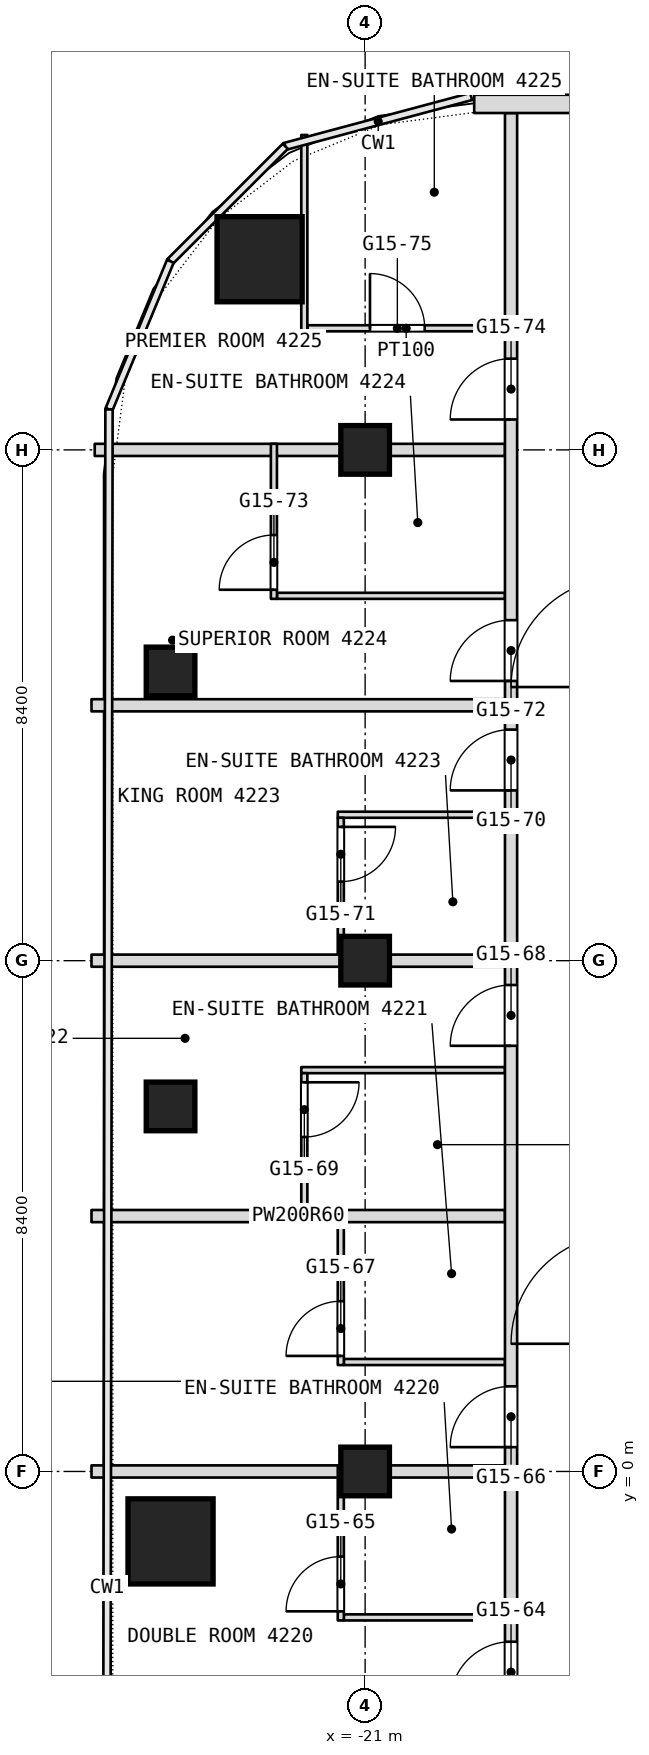
"""IFC4 building model, lengths in metres.
Left out: names, types, materials, properties, quantities, classifications, styles, units other than length and angle.
Written with IfcOpenShell. Run it as: python <this file> out.ifc"""

import sys

from ifc_helpers import new_model, si_unit, direction, frame, frame_2d, origin, origin_2d, place, context, subcontext, project, spatial, rectangle, extrude, element, fill, save


model = new_model("IFC4")
c1 = context("Model", 3, precision=1e-05, world=origin(), true_north=direction((0.0, 1.0)))
c2 = subcontext(c1, "Body", "Model", "MODEL_VIEW")
j1 = project(units=[si_unit("LENGTHUNIT", "METRE"), si_unit("PLANEANGLEUNIT", "RADIAN")], contexts=[c1])
p1 = place(None, origin())
s1 = spatial("IfcSite", under=j1, at=p1, CompositionType="ELEMENT")
p2 = place(p1, origin())
s2 = spatial("IfcBuilding", under=s1, at=p2, CompositionType="ELEMENT")
p3 = place(p2, frame((0.0, 0.0, 187.7)))
s3 = spatial("IfcBuildingStorey", under=s2, at=p3, CompositionType="ELEMENT", Elevation=187.7)
for number, where, z_axis, x_axis in (
    (1, (-22.736, 19.936, 0.0), (0.0, 0.0, 1.0), (1.0, 0.0, 0.0)),
    (2, (-24.2, -1.15, 0.0), (0.0, 0.0, 1.0), (1.0, 0.0, 0.0)),
):
    element("IfcColumn", number, at=place(p3, frame(where, z_axis=z_axis, x_axis=x_axis)), inside=s3, PredefinedType="COLUMN", context=c2, shape_type="SweptSolid", body=[
        extrude(rectangle(XDim=1.4, YDim=1.4, at=origin_2d()), origin(), (0.0, 0.0, 1.0), 3.6),
    ])
for number, where, z_axis, x_axis in (
    (3, (-21.0, 0.0, 0.0), (0.0, 0.0, 1.0), (1.0, 0.0, 0.0)),
    (4, (-21.0, 8.4, 0.0), (0.0, 0.0, 1.0), (1.0, 0.0, 0.0)),
    (5, (-21.0, 16.8, 0.0), (0.0, 0.0, 1.0), (1.0, 0.0, 0.0)),
    (6, (-24.2, 6.003, 0.0), (0.0, 0.0, 1.0), (1.0, 0.0, 0.0)),
    (7, (-24.2, 13.156, 0.0), (0.0, 0.0, 1.0), (1.0, 0.0, 0.0)),
):
    element("IfcColumn", number, at=place(p3, frame(where, z_axis=z_axis, x_axis=x_axis)), inside=s3, PredefinedType="COLUMN", context=c2, shape_type="SweptSolid", body=[
        extrude(rectangle(XDim=0.8, YDim=0.8, at=origin_2d()), origin(), (0.0, 0.0, 1.0), 3.6),
    ])
p4 = place(p3, frame((-21.35, -2.4, 0.0), z_axis=(0.0, 0.0, 1.0), x_axis=(1.0, 0.0, 0.0)))
e8 = element("IfcWall", 8, at=p4, inside=s3, PredefinedType="PARTITIONING", context=c2, shape_type="SweptSolid", body=[
    extrude(rectangle(XDim=2.65, YDim=0.1, at=frame_2d((1.325, 0.0))), origin(), (0.0, 0.0, 1.0), 3.34),
])
p5 = place(p3, frame((-25.5, 0.0, 0.0), z_axis=(0.0, 0.0, 1.0), x_axis=(1.0, 0.0, 0.0)))
e9 = element("IfcWall", 9, at=p5, inside=s3, PredefinedType="PARTITIONING", context=c2, shape_type="SweptSolid", body=[
    extrude(rectangle(XDim=6.8, YDim=0.2, at=frame_2d((3.4, 0.0))), origin(), (0.0, 0.0, 1.0), 2.94),
])
p6 = place(p3, frame((-21.35, 1.8, 0.0), z_axis=(0.0, 0.0, 1.0), x_axis=(1.0, 0.0, 0.0)))
e10 = element("IfcWall", 10, at=p6, inside=s3, PredefinedType="PARTITIONING", context=c2, shape_type="SweptSolid", body=[
    extrude(rectangle(XDim=2.65, YDim=0.1, at=frame_2d((1.325, 0.0))), origin(), (0.0, 0.0, 1.0), 3.34),
])
p7 = place(p3, frame((-25.5, 4.2, 0.0), z_axis=(0.0, 0.0, 1.0), x_axis=(1.0, 0.0, 0.0)))
e11 = element("IfcWall", 11, at=p7, inside=s3, PredefinedType="PARTITIONING", context=c2, shape_type="SweptSolid", body=[
    extrude(rectangle(XDim=6.8, YDim=0.2, at=frame_2d((3.4, 0.0))), origin(), (0.0, 0.0, 1.0), 3.34),
])
p8 = place(p3, frame((-22.05, 6.6, 0.0), z_axis=(0.0, 0.0, 1.0), x_axis=(1.0, 0.0, 0.0)))
e12 = element("IfcWall", 12, at=p8, inside=s3, PredefinedType="PARTITIONING", context=c2, shape_type="SweptSolid", body=[
    extrude(rectangle(XDim=3.35, YDim=0.1, at=frame_2d((1.675, 0.0))), origin(), (0.0, 0.0, 1.0), 3.34),
])
p9 = place(p3, frame((-25.5, 8.4, 0.0), z_axis=(0.0, 0.0, 1.0), x_axis=(1.0, 0.0, 0.0)))
e13 = element("IfcWall", 13, at=p9, inside=s3, PredefinedType="PARTITIONING", context=c2, shape_type="SweptSolid", body=[
    extrude(rectangle(XDim=6.8, YDim=0.2, at=frame_2d((3.4, 0.0))), origin(), (0.0, 0.0, 1.0), 2.94),
])
p10 = place(p3, frame((-21.45, 10.8, 0.0), z_axis=(0.0, 0.0, 1.0), x_axis=(1.0, 0.0, 0.0)))
e14 = element("IfcWall", 14, at=p10, inside=s3, PredefinedType="PARTITIONING", context=c2, shape_type="SweptSolid", body=[
    extrude(rectangle(XDim=2.75, YDim=0.1, at=frame_2d((1.375, 0.0))), origin(), (0.0, 0.0, 1.0), 3.34),
])
p11 = place(p3, frame((-25.5, 12.6, 0.0), z_axis=(0.0, 0.0, 1.0), x_axis=(1.0, 0.0, 0.0)))
e15 = element("IfcWall", 15, at=p11, inside=s3, PredefinedType="PARTITIONING", context=c2, shape_type="SweptSolid", body=[
    extrude(rectangle(XDim=6.8, YDim=0.2, at=frame_2d((3.4, 0.0))), origin(), (0.0, 0.0, 1.0), 3.34),
])
p12 = place(p3, frame((-22.45, 14.4, 0.0), z_axis=(0.0, 0.0, 1.0), x_axis=(1.0, 0.0, 0.0)))
e16 = element("IfcWall", 16, at=p12, inside=s3, PredefinedType="PARTITIONING", context=c2, shape_type="SweptSolid", body=[
    extrude(rectangle(XDim=3.75, YDim=0.1, at=frame_2d((1.875, 0.0))), origin(), (0.0, 0.0, 1.0), 3.34),
])
p13 = place(p3, frame((-25.447, 16.8, 0.0), z_axis=(0.0, 0.0, 1.0), x_axis=(1.0, 0.0, 0.0)))
e17 = element("IfcWall", 17, at=p13, inside=s3, PredefinedType="PARTITIONING", context=c2, shape_type="SweptSolid", body=[
    extrude(rectangle(XDim=6.747, YDim=0.2, at=frame_2d((3.374, 0.0))), origin(), (0.0, 0.0, 1.0), 2.94),
])
p14 = place(p3, frame((-18.6, -26.751, 0.0), z_axis=(0.0, 0.0, 1.0), x_axis=(0.0, 1.0, 0.0)))
e18 = element("IfcWall", 18, at=p14, inside=s3, PredefinedType="PARTITIONING", context=c2, shape_type="SweptSolid", body=[
    extrude(rectangle(XDim=49.091, YDim=0.2, at=frame_2d((24.545, 0.0))), origin(), (0.0, 0.0, 1.0), 3.34),
])
p15 = place(p14, frame((3.413, 0.0, 0.0)))
e19 = element("IfcOpeningElement", 19, at=p15, cuts=e18, PredefinedType="OPENING", context=c2, shape_type="SweptSolid", body=[
    extrude(rectangle(XDim=1.0, YDim=2.1, at=frame_2d((0.5, 1.05))), frame((0.0, 0.1, 0.0), z_axis=(0.0, -1.0, 0.0), x_axis=(1.0, 0.0, 0.0)), (0.0, 0.0, 1.0), 0.2),
])
p16 = place(p14, frame((5.838, 0.0, 0.0)))
e20 = element("IfcOpeningElement", 20, at=p16, cuts=e18, PredefinedType="OPENING", context=c2, shape_type="SweptSolid", body=[
    extrude(rectangle(XDim=1.0, YDim=2.1, at=frame_2d((0.5, 1.05))), frame((0.0, 0.1, 0.0), z_axis=(0.0, -1.0, 0.0), x_axis=(1.0, 0.0, 0.0)), (0.0, 0.0, 1.0), 0.2),
])
p17 = place(p14, frame((10.351, 0.0, 0.0)))
e21 = element("IfcOpeningElement", 21, at=p17, cuts=e18, PredefinedType="OPENING", context=c2, shape_type="SweptSolid", body=[
    extrude(rectangle(XDim=1.0, YDim=2.1, at=frame_2d((0.5, 1.05))), frame((0.0, 0.1, 0.0), z_axis=(0.0, -1.0, 0.0), x_axis=(1.0, 0.0, 0.0)), (0.0, 0.0, 1.0), 0.2),
])
p18 = place(p14, frame((16.951, 0.0, 0.0)))
e22 = element("IfcOpeningElement", 22, at=p18, cuts=e18, PredefinedType="OPENING", context=c2, shape_type="SweptSolid", body=[
    extrude(rectangle(XDim=1.0, YDim=2.1, at=frame_2d((0.5, 1.05))), frame((0.0, 0.1, 0.0), z_axis=(0.0, -1.0, 0.0), x_axis=(1.0, 0.0, 0.0)), (0.0, 0.0, 1.0), 0.2),
])
p19 = place(p14, frame((21.151, 0.0, 0.0)))
e23 = element("IfcOpeningElement", 23, at=p19, cuts=e18, PredefinedType="OPENING", context=c2, shape_type="SweptSolid", body=[
    extrude(rectangle(XDim=1.0, YDim=2.1, at=frame_2d((0.5, 1.05))), frame((0.0, 0.1, 0.0), z_axis=(0.0, -1.0, 0.0), x_axis=(1.0, 0.0, 0.0)), (0.0, 0.0, 1.0), 0.2),
])
p20 = place(p14, frame((22.951, 0.0, 0.0)))
e24 = element("IfcOpeningElement", 24, at=p20, cuts=e18, PredefinedType="OPENING", context=c2, shape_type="SweptSolid", body=[
    extrude(rectangle(XDim=1.0, YDim=2.1, at=frame_2d((0.5, 1.05))), frame((0.0, 0.1, 0.0), z_axis=(0.0, -1.0, 0.0), x_axis=(1.0, 0.0, 0.0)), (0.0, 0.0, 1.0), 0.2),
])
p21 = place(p14, frame((27.151, 0.0, 0.0)))
e25 = element("IfcOpeningElement", 25, at=p21, cuts=e18, PredefinedType="OPENING", context=c2, shape_type="SweptSolid", body=[
    extrude(rectangle(XDim=1.0, YDim=2.1, at=frame_2d((0.5, 1.05))), frame((0.0, 0.1, 0.0), z_axis=(0.0, -1.0, 0.0), x_axis=(1.0, 0.0, 0.0)), (0.0, 0.0, 1.0), 0.2),
])
p22 = place(p14, frame((33.751, 0.0, 0.0)))
e26 = element("IfcOpeningElement", 26, at=p22, cuts=e18, PredefinedType="OPENING", context=c2, shape_type="SweptSolid", body=[
    extrude(rectangle(XDim=1.0, YDim=2.1, at=frame_2d((0.5, 1.05))), frame((0.0, 0.1, 0.0), z_axis=(0.0, -1.0, 0.0), x_axis=(1.0, 0.0, 0.0)), (0.0, 0.0, 1.0), 0.2),
])
p23 = place(p14, frame((37.951, 0.0, 0.0)))
e27 = element("IfcOpeningElement", 27, at=p23, cuts=e18, PredefinedType="OPENING", context=c2, shape_type="SweptSolid", body=[
    extrude(rectangle(XDim=1.0, YDim=2.1, at=frame_2d((0.5, 1.05))), frame((0.0, 0.1, 0.0), z_axis=(0.0, -1.0, 0.0), x_axis=(1.0, 0.0, 0.0)), (0.0, 0.0, 1.0), 0.2),
])
p24 = place(p14, frame((39.751, 0.0, 0.0)))
e28 = element("IfcOpeningElement", 28, at=p24, cuts=e18, PredefinedType="OPENING", context=c2, shape_type="SweptSolid", body=[
    extrude(rectangle(XDim=1.0, YDim=2.1, at=frame_2d((0.5, 1.05))), frame((0.0, 0.1, 0.0), z_axis=(0.0, -1.0, 0.0), x_axis=(1.0, 0.0, 0.0)), (0.0, 0.0, 1.0), 0.2),
])
p25 = place(p14, frame((44.051, 0.0, 0.0)))
e29 = element("IfcOpeningElement", 29, at=p25, cuts=e18, PredefinedType="OPENING", context=c2, shape_type="SweptSolid", body=[
    extrude(rectangle(XDim=1.0, YDim=2.1, at=frame_2d((0.5, 1.05))), frame((0.0, 0.1, 0.0), z_axis=(0.0, -1.0, 0.0), x_axis=(1.0, 0.0, 0.0)), (0.0, 0.0, 1.0), 0.2),
])
p26 = place(p3, frame((-21.95, 18.8, 0.0), z_axis=(0.0, 0.0, 1.0), x_axis=(1.0, 0.0, 0.0)))
e30 = element("IfcWall", 30, at=p26, inside=s3, PredefinedType="PARTITIONING", context=c2, shape_type="SweptSolid", body=[
    extrude(rectangle(XDim=3.25, YDim=0.1, at=frame_2d((1.625, 0.0))), origin(), (0.0, 0.0, 1.0), 3.34),
])
p27 = place(p26, frame((1.03, 0.0, 0.0)))
e31 = element("IfcOpeningElement", 31, at=p27, cuts=e30, PredefinedType="OPENING", context=c2, shape_type="SweptSolid", body=[
    extrude(rectangle(XDim=0.9, YDim=2.1, at=frame_2d((0.45, 1.05))), frame((0.0, 0.05, 0.0), z_axis=(0.0, -1.0, 0.0), x_axis=(1.0, 0.0, 0.0)), (0.0, 0.0, 1.0), 0.1),
])
p28 = place(p3, frame((-21.4, -2.45, 0.0), z_axis=(0.0, 0.0, 1.0), x_axis=(0.0, 1.0, 0.0)))
e32 = element("IfcWall", 32, at=p28, inside=s3, PredefinedType="PARTITIONING", context=c2, shape_type="SweptSolid", body=[
    extrude(rectangle(XDim=2.55, YDim=0.1, at=frame_2d((1.275, 0.0))), origin(), (0.0, 0.0, 1.0), 3.34),
])
p29 = place(p28, frame((0.15, 0.0, 0.0)))
e33 = element("IfcOpeningElement", 33, at=p29, cuts=e32, PredefinedType="OPENING", context=c2, shape_type="SweptSolid", body=[
    extrude(rectangle(XDim=0.9, YDim=2.1, at=frame_2d((0.45, 1.05))), frame((0.0, 0.05, 0.0), z_axis=(0.0, -1.0, 0.0), x_axis=(1.0, 0.0, 0.0)), (0.0, 0.0, 1.0), 0.1),
])
p30 = place(p3, frame((-21.4, 1.75, 0.0), z_axis=(0.0, 0.0, 1.0), x_axis=(0.0, 1.0, 0.0)))
e34 = element("IfcWall", 34, at=p30, inside=s3, PredefinedType="PARTITIONING", context=c2, shape_type="SweptSolid", body=[
    extrude(rectangle(XDim=2.55, YDim=0.1, at=frame_2d((1.275, 0.0))), origin(), (0.0, 0.0, 1.0), 3.34),
])
p31 = place(p30, frame((0.15, 0.0, 0.0)))
e35 = element("IfcOpeningElement", 35, at=p31, cuts=e34, PredefinedType="OPENING", context=c2, shape_type="SweptSolid", body=[
    extrude(rectangle(XDim=0.9, YDim=2.1, at=frame_2d((0.45, 1.05))), frame((0.0, 0.05, 0.0), z_axis=(0.0, -1.0, 0.0), x_axis=(1.0, 0.0, 0.0)), (0.0, 0.0, 1.0), 0.1),
])
p32 = place(p3, frame((-21.4, 8.5, 0.0), z_axis=(0.0, 0.0, 1.0), x_axis=(0.0, 1.0, 0.0)))
e36 = element("IfcWall", 36, at=p32, inside=s3, PredefinedType="PARTITIONING", context=c2, shape_type="SweptSolid", body=[
    extrude(rectangle(XDim=2.25, YDim=0.1, at=frame_2d((1.125, 0.0))), origin(), (0.0, 0.0, 1.0), 3.34),
])
p33 = place(p32, frame((1.2, 0.0, 0.0)))
e37 = element("IfcOpeningElement", 37, at=p33, cuts=e36, PredefinedType="OPENING", context=c2, shape_type="SweptSolid", body=[
    extrude(rectangle(XDim=0.9, YDim=2.1, at=frame_2d((0.45, 1.05))), frame((0.0, 0.05, 0.0), z_axis=(0.0, -1.0, 0.0), x_axis=(1.0, 0.0, 0.0)), (0.0, 0.0, 1.0), 0.1),
])
p34 = place(p3, frame((-22.0, 4.3, 0.0), z_axis=(0.0, 0.0, 1.0), x_axis=(0.0, 1.0, 0.0)))
e38 = element("IfcWall", 38, at=p34, inside=s3, PredefinedType="PARTITIONING", context=c2, shape_type="SweptSolid", body=[
    extrude(rectangle(XDim=2.25, YDim=0.1, at=frame_2d((1.125, 0.0))), origin(), (0.0, 0.0, 1.0), 3.34),
])
p35 = place(p34, frame((1.2, 0.0, 0.0)))
e39 = element("IfcOpeningElement", 39, at=p35, cuts=e38, PredefinedType="OPENING", context=c2, shape_type="SweptSolid", body=[
    extrude(rectangle(XDim=0.9, YDim=2.1, at=frame_2d((0.45, 1.05))), frame((0.0, 0.05, 0.0), z_axis=(0.0, -1.0, 0.0), x_axis=(1.0, 0.0, 0.0)), (0.0, 0.0, 1.0), 0.1),
])
p36 = place(p3, frame((-22.0, 18.75, 0.0), z_axis=(0.0, 0.0, 1.0), x_axis=(0.0, 1.0, 0.0)))
e40 = element("IfcWall", 40, at=p36, inside=s3, PredefinedType="PARTITIONING", context=c2, shape_type="SweptSolid", body=[
    extrude(rectangle(XDim=3.229, YDim=0.1, at=frame_2d((1.615, 0.0))), origin(), (0.0, 0.0, 1.0), 3.34),
])
p37 = place(p3, frame((-22.5, 14.35, 0.0), z_axis=(0.0, 0.0, 1.0), x_axis=(0.0, 1.0, 0.0)))
e41 = element("IfcWall", 41, at=p37, inside=s3, PredefinedType="PARTITIONING", context=c2, shape_type="SweptSolid", body=[
    extrude(rectangle(XDim=2.55, YDim=0.1, at=frame_2d((1.275, 0.0))), origin(), (0.0, 0.0, 1.0), 3.34),
])
p38 = place(p37, frame((0.15, 0.0, 0.0)))
e42 = element("IfcOpeningElement", 42, at=p38, cuts=e41, PredefinedType="OPENING", context=c2, shape_type="SweptSolid", body=[
    extrude(rectangle(XDim=0.9, YDim=2.1, at=frame_2d((0.45, 1.05))), frame((0.0, 0.05, 0.0), z_axis=(0.0, -1.0, 0.0), x_axis=(1.0, 0.0, 0.0)), (0.0, 0.0, 1.0), 0.1),
])
p39 = place(p3, frame((19.206, 22.49, 0.0), z_axis=(0.0, 0.0, 1.0), x_axis=(-1.0, 0.0, 0.0)))
e43 = element("IfcWall", 43, at=p39, inside=s3, PredefinedType="NOTDEFINED", context=c2, shape_type="SweptSolid", body=[
    extrude(rectangle(XDim=38.412, YDim=0.3, at=frame_2d((19.206, 0.0))), origin(), (0.0, 0.0, 1.0), 3.6),
])
p40 = place(p39, frame((3.306, 0.0, 0.9)))
e44 = element("IfcOpeningElement", 44, at=p40, cuts=e43, PredefinedType="OPENING", context=c2, shape_type="SweptSolid", body=[
    extrude(rectangle(XDim=2.4, YDim=2.1, at=frame_2d((1.2, 1.05))), frame((0.0, 0.15, 0.0), z_axis=(0.0, -1.0, 0.0), x_axis=(1.0, 0.0, 0.0)), (0.0, 0.0, 1.0), 0.3),
])
p41 = place(p39, frame((7.506, 0.0, 0.9)))
e45 = element("IfcOpeningElement", 45, at=p41, cuts=e43, PredefinedType="OPENING", context=c2, shape_type="SweptSolid", body=[
    extrude(rectangle(XDim=2.4, YDim=2.1, at=frame_2d((1.2, 1.05))), frame((0.0, 0.15, 0.0), z_axis=(0.0, -1.0, 0.0), x_axis=(1.0, 0.0, 0.0)), (0.0, 0.0, 1.0), 0.3),
])
p42 = place(p39, frame((11.706, 0.0, 0.9)))
e46 = element("IfcOpeningElement", 46, at=p42, cuts=e43, PredefinedType="OPENING", context=c2, shape_type="SweptSolid", body=[
    extrude(rectangle(XDim=2.4, YDim=2.1, at=frame_2d((1.2, 1.05))), frame((0.0, 0.15, 0.0), z_axis=(0.0, -1.0, 0.0), x_axis=(1.0, 0.0, 0.0)), (0.0, 0.0, 1.0), 0.3),
])
p43 = place(p39, frame((15.906, 0.0, 0.9)))
e47 = element("IfcOpeningElement", 47, at=p43, cuts=e43, PredefinedType="OPENING", context=c2, shape_type="SweptSolid", body=[
    extrude(rectangle(XDim=2.4, YDim=2.1, at=frame_2d((1.2, 1.05))), frame((0.0, 0.15, 0.0), z_axis=(0.0, -1.0, 0.0), x_axis=(1.0, 0.0, 0.0)), (0.0, 0.0, 1.0), 0.3),
])
p44 = place(p39, frame((20.106, 0.0, 0.9)))
e48 = element("IfcOpeningElement", 48, at=p44, cuts=e43, PredefinedType="OPENING", context=c2, shape_type="SweptSolid", body=[
    extrude(rectangle(XDim=2.4, YDim=2.1, at=frame_2d((1.2, 1.05))), frame((0.0, 0.15, 0.0), z_axis=(0.0, -1.0, 0.0), x_axis=(1.0, 0.0, 0.0)), (0.0, 0.0, 1.0), 0.3),
])
p45 = place(p39, frame((24.306, 0.0, 0.9)))
e49 = element("IfcOpeningElement", 49, at=p45, cuts=e43, PredefinedType="OPENING", context=c2, shape_type="SweptSolid", body=[
    extrude(rectangle(XDim=2.4, YDim=2.1, at=frame_2d((1.2, 1.05))), frame((0.0, 0.15, 0.0), z_axis=(0.0, -1.0, 0.0), x_axis=(1.0, 0.0, 0.0)), (0.0, 0.0, 1.0), 0.3),
])
p46 = place(p39, frame((28.506, 0.0, 0.9)))
e50 = element("IfcOpeningElement", 50, at=p46, cuts=e43, PredefinedType="OPENING", context=c2, shape_type="SweptSolid", body=[
    extrude(rectangle(XDim=2.4, YDim=2.1, at=frame_2d((1.2, 1.05))), frame((0.0, 0.15, 0.0), z_axis=(0.0, -1.0, 0.0), x_axis=(1.0, 0.0, 0.0)), (0.0, 0.0, 1.0), 0.3),
])
p47 = place(p39, frame((32.706, 0.0, 0.9)))
e51 = element("IfcOpeningElement", 51, at=p47, cuts=e43, PredefinedType="OPENING", context=c2, shape_type="SweptSolid", body=[
    extrude(rectangle(XDim=2.4, YDim=2.1, at=frame_2d((1.2, 1.05))), frame((0.0, 0.15, 0.0), z_axis=(0.0, -1.0, 0.0), x_axis=(1.0, 0.0, 0.0)), (0.0, 0.0, 1.0), 0.3),
])
p48 = place(p20, origin())
e52 = element("IfcDoor", 52, at=p48, inside=s3, OperationType="SINGLE_SWING_LEFT", PredefinedType="DOOR", context=c2, shape_type="SweptSolid", body=[
    extrude(rectangle(XDim=1.0, YDim=2.1, at=frame_2d((0.5, 1.05))), frame((0.0, 0.025, 0.0), z_axis=(0.0, -1.0, 0.0), x_axis=(1.0, 0.0, 0.0)), (0.0, 0.0, 1.0), 0.05),
])
fill(e24, e52)
p49 = place(p21, origin())
e53 = element("IfcDoor", 53, at=p49, inside=s3, OperationType="SINGLE_SWING_LEFT", PredefinedType="DOOR", context=c2, shape_type="SweptSolid", body=[
    extrude(rectangle(XDim=1.0, YDim=2.1, at=frame_2d((0.5, 1.05))), frame((0.0, 0.025, 0.0), z_axis=(0.0, -1.0, 0.0), x_axis=(1.0, 0.0, 0.0)), (0.0, 0.0, 1.0), 0.05),
])
fill(e25, e53)
p50 = place(p22, origin())
e54 = element("IfcDoor", 54, at=p50, inside=s3, OperationType="SINGLE_SWING_LEFT", PredefinedType="DOOR", context=c2, shape_type="SweptSolid", body=[
    extrude(rectangle(XDim=1.0, YDim=2.1, at=frame_2d((0.5, 1.05))), frame((0.0, 0.025, 0.0), z_axis=(0.0, -1.0, 0.0), x_axis=(1.0, 0.0, 0.0)), (0.0, 0.0, 1.0), 0.05),
])
fill(e26, e54)
p51 = place(p23, origin())
e55 = element("IfcDoor", 55, at=p51, inside=s3, OperationType="SINGLE_SWING_LEFT", PredefinedType="DOOR", context=c2, shape_type="SweptSolid", body=[
    extrude(rectangle(XDim=1.0, YDim=2.1, at=frame_2d((0.5, 1.05))), frame((0.0, 0.025, 0.0), z_axis=(0.0, -1.0, 0.0), x_axis=(1.0, 0.0, 0.0)), (0.0, 0.0, 1.0), 0.05),
])
fill(e27, e55)
p52 = place(p24, origin())
e56 = element("IfcDoor", 56, at=p52, inside=s3, OperationType="SINGLE_SWING_LEFT", PredefinedType="DOOR", context=c2, shape_type="SweptSolid", body=[
    extrude(rectangle(XDim=1.0, YDim=2.1, at=frame_2d((0.5, 1.05))), frame((0.0, 0.025, 0.0), z_axis=(0.0, -1.0, 0.0), x_axis=(1.0, 0.0, 0.0)), (0.0, 0.0, 1.0), 0.05),
])
fill(e28, e56)
p53 = place(p25, origin())
e57 = element("IfcDoor", 57, at=p53, inside=s3, OperationType="SINGLE_SWING_LEFT", PredefinedType="DOOR", context=c2, shape_type="SweptSolid", body=[
    extrude(rectangle(XDim=1.0, YDim=2.1, at=frame_2d((0.5, 1.05))), frame((0.0, 0.025, 0.0), z_axis=(0.0, -1.0, 0.0), x_axis=(1.0, 0.0, 0.0)), (0.0, 0.0, 1.0), 0.05),
])
fill(e29, e57)
p54 = place(p27, origin())
e58 = element("IfcDoor", 58, at=p54, inside=s3, OperationType="SINGLE_SWING_LEFT", PredefinedType="DOOR", context=c2, shape_type="SweptSolid", body=[
    extrude(rectangle(XDim=0.9, YDim=2.1, at=frame_2d((0.45, 1.05))), frame((0.0, 0.025, 0.0), z_axis=(0.0, -1.0, 0.0), x_axis=(1.0, 0.0, 0.0)), (0.0, 0.0, 1.0), 0.05),
])
fill(e31, e58)
p55 = place(p29, origin())
e59 = element("IfcDoor", 59, at=p55, inside=s3, OperationType="SINGLE_SWING_RIGHT", PredefinedType="DOOR", context=c2, shape_type="SweptSolid", body=[
    extrude(rectangle(XDim=0.9, YDim=2.1, at=frame_2d((0.45, 1.05))), frame((0.0, 0.025, 0.0), z_axis=(0.0, -1.0, 0.0), x_axis=(1.0, 0.0, 0.0)), (0.0, 0.0, 1.0), 0.05),
])
fill(e33, e59)
p56 = place(p31, origin())
e60 = element("IfcDoor", 60, at=p56, inside=s3, OperationType="SINGLE_SWING_RIGHT", PredefinedType="DOOR", context=c2, shape_type="SweptSolid", body=[
    extrude(rectangle(XDim=0.9, YDim=2.1, at=frame_2d((0.45, 1.05))), frame((0.0, 0.025, 0.0), z_axis=(0.0, -1.0, 0.0), x_axis=(1.0, 0.0, 0.0)), (0.0, 0.0, 1.0), 0.05),
])
fill(e35, e60)
p57 = place(p33, origin())
e61 = element("IfcDoor", 61, at=p57, inside=s3, OperationType="SINGLE_SWING_LEFT", PredefinedType="DOOR", context=c2, shape_type="SweptSolid", body=[
    extrude(rectangle(XDim=0.9, YDim=2.1, at=frame_2d((0.45, 1.05))), frame((0.0, 0.025, 0.0), z_axis=(0.0, -1.0, 0.0), x_axis=(1.0, 0.0, 0.0)), (0.0, 0.0, 1.0), 0.05),
])
fill(e37, e61)
p58 = place(p35, origin())
e62 = element("IfcDoor", 62, at=p58, inside=s3, OperationType="SINGLE_SWING_LEFT", PredefinedType="DOOR", context=c2, shape_type="SweptSolid", body=[
    extrude(rectangle(XDim=0.9, YDim=2.1, at=frame_2d((0.45, 1.05))), frame((0.0, 0.025, 0.0), z_axis=(0.0, -1.0, 0.0), x_axis=(1.0, 0.0, 0.0)), (0.0, 0.0, 1.0), 0.05),
])
fill(e39, e62)
p59 = place(p38, origin())
e63 = element("IfcDoor", 63, at=p59, inside=s3, OperationType="SINGLE_SWING_RIGHT", PredefinedType="DOOR", context=c2, shape_type="SweptSolid", body=[
    extrude(rectangle(XDim=0.9, YDim=2.1, at=frame_2d((0.45, 1.05))), frame((0.0, 0.025, 0.0), z_axis=(0.0, -1.0, 0.0), x_axis=(1.0, 0.0, 0.0)), (0.0, 0.0, 1.0), 0.05),
])
fill(e42, e63)
save(model, sys.argv[1])
